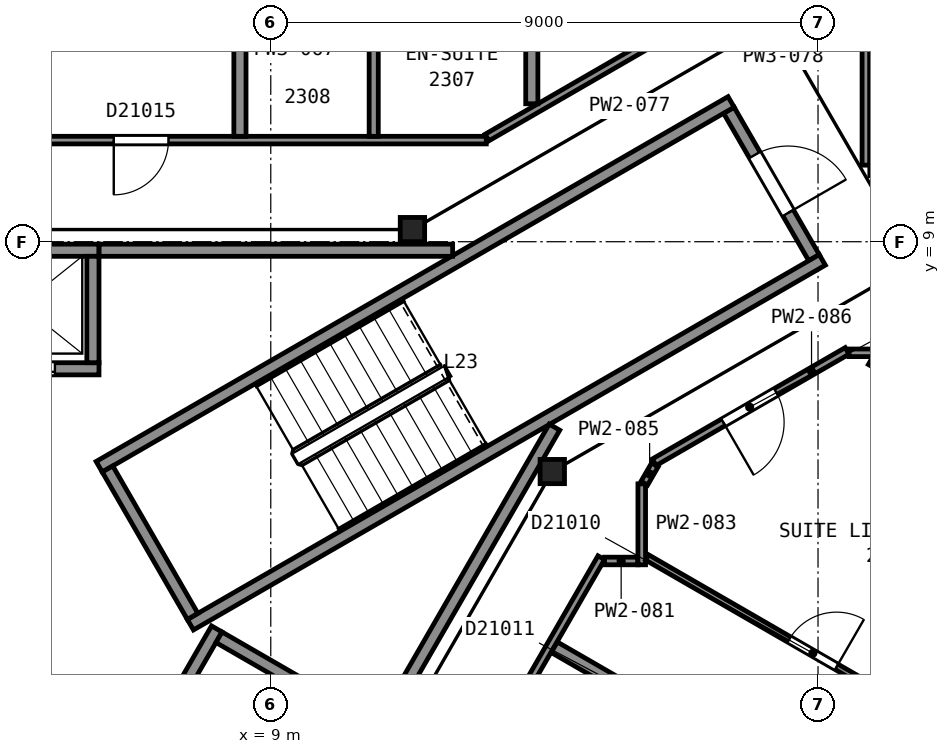
"""IFC4 building model, lengths in metres.
Left out: names, types, materials, properties, quantities, classifications, styles, units other than length and angle.
Written with IfcOpenShell. Run it as: python <this file> out.ifc"""

import sys

from ifc_helpers import new_model, si_unit, direction, frame, frame_2d, origin, origin_2d, place, context, subcontext, project, spatial, rectangle, i_section, extrude, element, fill, save


model = new_model("IFC4")
c1 = context("Model", 3, precision=1e-05, world=origin(), true_north=direction((0.0, 1.0)))
c2 = subcontext(c1, "Body", "Model", "MODEL_VIEW")
j1 = project(units=[si_unit("LENGTHUNIT", "METRE"), si_unit("PLANEANGLEUNIT", "RADIAN")], contexts=[c1])
p1 = place(None, origin())
s1 = spatial("IfcSite", under=j1, at=p1, CompositionType="ELEMENT")
p2 = place(p1, origin())
s2 = spatial("IfcBuilding", under=s1, at=p2, CompositionType="ELEMENT")
p3 = place(p2, frame((0.0, 0.0, 100.0)))
s3 = spatial("IfcBuildingStorey", under=s2, at=p3, CompositionType="ELEMENT", Elevation=100.0)
for number, where, z_axis, x_axis in (
    (1, (13.63, 5.22, 0.0), (0.0, 0.0, 1.0), (1.0, 0.0, 0.0)),
    (2, (11.33, 9.2, 0.0), (0.0, 0.0, 1.0), (1.0, 0.0, 0.0)),
):
    element("IfcColumn", number, at=place(p3, frame(where, z_axis=z_axis, x_axis=x_axis)), inside=s3, PredefinedType="COLUMN", context=c2, shape_type="SweptSolid", body=[
        extrude(i_section(OverallWidth=0.401, OverallDepth=0.399, WebThickness=0.025, FlangeThickness=0.04, FilletRadius=0.015, at=origin_2d()), origin(), (0.0, 0.0, 1.0), 3.6),
    ])
p4 = place(p3, frame((17.934, 8.738, 0.0), z_axis=(0.0, 0.0, 1.0), x_axis=(-0.49998411664, 0.866034573852, 0.0)))
e3 = element("IfcWall", 3, at=p4, inside=s3, PredefinedType="PARTITIONING", context=c2, shape_type="SweptSolid", body=[
    extrude(rectangle(XDim=2.8, YDim=0.2, at=frame_2d((1.4, 0.0))), origin(), (0.0, 0.0, 1.0), 3.35),
])
p5 = place(p4, frame((0.85, 0.0, 0.0)))
e4 = element("IfcOpeningElement", 4, at=p5, cuts=e3, PredefinedType="OPENING", context=c2, shape_type="SweptSolid", body=[
    extrude(rectangle(XDim=1.1, YDim=2.1, at=frame_2d((0.55, 1.05))), frame((0.0, 0.11, 0.0), z_axis=(0.0, -1.0, 0.0), x_axis=(1.0, 0.0, 0.0)), (0.0, 0.0, 1.0), 0.22),
])
for number, where, z_axis, x_axis in (
    (5, (6.178, 5.299, 0.0), (0.0, 0.0, 1.0), (0.866, 0.5, 0.0)),
    (6, (7.678, 2.701, 0.0), (0.0, 0.0, 1.0), (0.866, 0.5, 0.0)),
):
    element("IfcWall", number, at=place(p3, frame(where, z_axis=z_axis, x_axis=x_axis)), inside=s3, PredefinedType="PARTITIONING", context=c2, shape_type="SweptSolid", body=[
        extrude(rectangle(XDim=12.0, YDim=0.2, at=frame_2d((6.0, 0.0))), origin(), (0.0, 0.0, 1.0), 3.35),
    ])
p6 = place(p3, frame((7.715, 2.838, 0.0), z_axis=(0.0, 0.0, 1.0), x_axis=(-0.500049511043, 0.865996816683, 0.0)))
e7 = element("IfcWall", 7, at=p6, inside=s3, PredefinedType="PARTITIONING", context=c2, shape_type="SweptSolid", body=[
    extrude(rectangle(XDim=2.8, YDim=0.2, at=frame_2d((1.4, 0.0))), origin(), (0.0, 0.0, 1.0), 3.35),
])
p7 = place(p3, frame((3.625, 6.91, 0.0), z_axis=(0.0, 0.0, 1.0), x_axis=(1.0, 0.0, 0.0)))
e8 = element("IfcWall", 8, at=p7, inside=s3, PredefinedType="PARTITIONING", context=c2, shape_type="SweptSolid", body=[
    extrude(rectangle(XDim=2.55, YDim=0.2, at=frame_2d((1.275, 0.0))), origin(), (0.0, 0.0, 1.0), 3.6),
])
p8 = place(p7, frame((0.725, 0.0, 0.0)))
e9 = element("IfcOpeningElement", 9, at=p8, cuts=e8, PredefinedType="OPENING", context=c2, shape_type="SweptSolid", body=[
    extrude(rectangle(XDim=1.1, YDim=2.1, at=frame_2d((0.55, 1.05))), frame((0.0, 0.11, 0.0), z_axis=(0.0, -1.0, 0.0), x_axis=(1.0, 0.0, 0.0)), (0.0, 0.0, 1.0), 0.22),
])
p9 = place(p3, frame((3.625, 8.86, 0.0), z_axis=(0.0, 0.0, 1.0), x_axis=(1.0, 0.0, 0.0)))
e10 = element("IfcWall", 10, at=p9, inside=s3, PredefinedType="PARTITIONING", context=c2, shape_type="SweptSolid", body=[
    extrude(rectangle(XDim=2.55, YDim=0.2, at=frame_2d((1.275, 0.0))), origin(), (0.0, 0.0, 1.0), 3.6),
])
p10 = place(p3, frame((5.663, -1.612, 0.0), z_axis=(0.0, 0.0, 1.0), x_axis=(0.49998122708, 0.866036242063, 0.0)))
e11 = element("IfcWall", 11, at=p10, inside=s3, PredefinedType="PARTITIONING", context=c2, shape_type="SweptSolid", body=[
    extrude(rectangle(XDim=4.9, YDim=0.2, at=frame_2d((2.45, 0.0))), origin(), (0.0, 0.0, 1.0), 3.6),
])
p11 = place(p3, frame((6.075, 7.01, 0.0), z_axis=(0.0, 0.0, 1.0), x_axis=(0.0, 1.0, 0.0)))
e12 = element("IfcWall", 12, at=p11, inside=s3, PredefinedType="PARTITIONING", context=c2, shape_type="SweptSolid", body=[
    extrude(rectangle(XDim=1.75, YDim=0.2, at=frame_2d((0.875, 0.0))), origin(), (0.0, 0.0, 1.0), 3.6),
])
p12 = place(p3, frame((9.665, 1.62, 0.0), z_axis=(0.0, 0.0, 1.0), x_axis=(-0.866002029911, 0.500040482552, 0.0)))
e13 = element("IfcWall", 13, at=p12, inside=s3, PredefinedType="PARTITIONING", context=c2, shape_type="SweptSolid", body=[
    extrude(rectangle(XDim=1.75, YDim=0.2, at=frame_2d((0.875, 0.0))), origin(), (0.0, 0.0, 1.0), 3.6),
])
p13 = place(p3, frame((6.177, 8.86, 0.0), z_axis=(0.0, 0.0, 1.0), x_axis=(1.0, 0.0, 0.0)))
e14 = element("IfcWall", 14, at=p13, inside=s3, PredefinedType="PARTITIONING", context=c2, shape_type="SweptSolid", body=[
    extrude(rectangle(XDim=5.814, YDim=0.2, at=frame_2d((2.907, 0.0))), origin(), (0.0, 0.0, 1.0), 3.35),
])
p14 = place(p3, frame((8.492, -3.012, 0.0), z_axis=(0.0, 0.0, 1.0), x_axis=(0.499972957231, 0.866041016371, 0.0)))
e15 = element("IfcWall", 15, at=p14, inside=s3, PredefinedType="PARTITIONING", context=c2, shape_type="SweptSolid", body=[
    extrude(rectangle(XDim=10.349, YDim=0.2, at=frame_2d((5.174, 0.0))), origin(), (0.0, 0.0, 1.0), 3.35),
])
p15 = place(p3, frame((-12.544, 10.671, 0.0), z_axis=(0.0, 0.0, 1.0), x_axis=(1.0, 0.0, 0.0)))
e16 = element("IfcWall", 16, at=p15, inside=s3, PredefinedType="PARTITIONING", context=c2, shape_type="SweptSolid", body=[
    extrude(rectangle(XDim=25.089, YDim=0.125, at=frame_2d((12.544, 0.0))), origin(), (0.0, 0.0, 1.0), 2.613),
])
p16 = place(p15, frame((18.962, 0.0, 0.0)))
e17 = element("IfcOpeningElement", 17, at=p16, cuts=e16, PredefinedType="OPENING", context=c2, shape_type="SweptSolid", body=[
    extrude(rectangle(XDim=0.9, YDim=2.1, at=frame_2d((0.45, 1.05))), frame((0.0, 0.073, 0.0), z_axis=(0.0, -1.0, 0.0), x_axis=(1.0, 0.0, 0.0)), (0.0, 0.0, 1.0), 0.145),
])
p17 = place(p15, frame((14.857, 0.0, 0.0)))
e18 = element("IfcOpeningElement", 18, at=p17, cuts=e16, PredefinedType="OPENING", context=c2, shape_type="SweptSolid", body=[
    extrude(rectangle(XDim=1.0, YDim=2.1, at=frame_2d((0.5, 1.05))), frame((0.0, 0.073, 0.0), z_axis=(0.0, -1.0, 0.0), x_axis=(1.0, 0.0, 0.0)), (0.0, 0.0, 1.0), 0.145),
])
p18 = place(p3, frame((8.493, 10.733, 0.0), z_axis=(0.0, 0.0, 1.0), x_axis=(0.0, 1.0, 0.0)))
e19 = element("IfcWall", 19, at=p18, inside=s3, PredefinedType="PARTITIONING", context=c2, shape_type="SweptSolid", body=[
    extrude(rectangle(XDim=2.838, YDim=0.2, at=frame_2d((1.419, 0.0))), origin(), (0.0, 0.0, 1.0), 2.613),
])
p19 = place(p3, frame((9.41, -4.902, 0.0), z_axis=(0.0, 0.0, 1.0), x_axis=(0.499971244726, 0.866042005013, 0.0)))
e20 = element("IfcWall", 20, at=p19, inside=s3, PredefinedType="PARTITIONING", context=c2, shape_type="SweptSolid", body=[
    extrude(rectangle(XDim=10.052, YDim=0.125, at=frame_2d((5.026, 0.0))), origin(), (0.0, 0.0, 1.0), 2.613),
])
p20 = place(p3, frame((10.693, 10.733, 0.0), z_axis=(0.0, 0.0, 1.0), x_axis=(0.0, 1.0, 0.0)))
e21 = element("IfcWall", 21, at=p20, inside=s3, PredefinedType="PARTITIONING", context=c2, shape_type="SweptSolid", body=[
    extrude(rectangle(XDim=6.982, YDim=0.15, at=frame_2d((3.491, 0.0))), origin(), (0.0, 0.0, 1.0), 2.613),
])
p21 = place(p3, frame((12.556, 10.713, 0.0), z_axis=(0.0, 0.0, 1.0), x_axis=(0.86603035395, 0.499991425964, 0.0)))
e22 = element("IfcWall", 22, at=p21, inside=s3, PredefinedType="PARTITIONING", context=c2, shape_type="SweptSolid", body=[
    extrude(rectangle(XDim=3.824, YDim=0.125, at=frame_2d((1.912, 0.0))), origin(), (0.0, 0.0, 1.0), 2.613),
])
p22 = place(p3, frame((13.293, 11.269, 0.0), z_axis=(0.0, 0.0, 1.0), x_axis=(0.0, 1.0, 0.0)))
e23 = element("IfcWall", 23, at=p22, inside=s3, PredefinedType="PARTITIONING", context=c2, shape_type="SweptSolid", body=[
    extrude(rectangle(XDim=3.665, YDim=0.2, at=frame_2d((1.833, 0.0))), origin(), (0.0, 0.0, 1.0), 2.613),
])
p23 = place(p22, frame((1.32, 0.0, 0.0)))
e24 = element("IfcOpeningElement", 24, at=p23, cuts=e23, PredefinedType="OPENING", context=c2, shape_type="SweptSolid", body=[
    extrude(rectangle(XDim=0.8, YDim=2.1, at=frame_2d((0.4, 1.05))), frame((0.0, 0.11, 0.0), z_axis=(0.0, -1.0, 0.0), x_axis=(1.0, 0.0, 0.0)), (0.0, 0.0, 1.0), 0.22),
])
p24 = place(p3, frame((16.463, 0.714, 0.0), z_axis=(0.0, 0.0, 1.0), x_axis=(-0.86609757561, 0.499874973892, 0.0)))
e25 = element("IfcWall", 25, at=p24, inside=s3, PredefinedType="PARTITIONING", context=c2, shape_type="SweptSolid", body=[
    extrude(rectangle(XDim=3.233, YDim=0.2, at=frame_2d((1.617, 0.0))), origin(), (0.0, 0.0, 1.0), 2.613),
])
p25 = place(p24, frame((1.301, 0.0, 0.0)))
e26 = element("IfcOpeningElement", 26, at=p25, cuts=e25, PredefinedType="OPENING", context=c2, shape_type="SweptSolid", body=[
    extrude(rectangle(XDim=0.8, YDim=2.1, at=frame_2d((0.4, 1.05))), frame((0.0, 0.11, 0.0), z_axis=(0.0, -1.0, 0.0), x_axis=(1.0, 0.0, 0.0)), (0.0, 0.0, 1.0), 0.22),
])
p26 = place(p3, frame((14.489, 3.749, 0.0), z_axis=(0.0, 0.0, 1.0), x_axis=(1.0, 0.0, 0.0)))
e27 = element("IfcWall", 27, at=p26, inside=s3, PredefinedType="PARTITIONING", context=c2, shape_type="SweptSolid", body=[
    extrude(rectangle(XDim=0.547, YDim=0.125, at=frame_2d((0.273, 0.0))), origin(), (0.0, 0.0, 1.0), 2.613),
])
p27 = place(p3, frame((15.101, 3.687, 0.0), z_axis=(0.0, 0.0, 1.0), x_axis=(0.0, 1.0, 0.0)))
e28 = element("IfcWall", 28, at=p27, inside=s3, PredefinedType="PARTITIONING", context=c2, shape_type="SweptSolid", body=[
    extrude(rectangle(XDim=1.331, YDim=0.125, at=frame_2d((0.666, 0.0))), origin(), (0.0, 0.0, 1.0), 2.613),
])
p28 = place(p3, frame((20.787, 0.575, 0.0), z_axis=(0.0, 0.0, 1.0), x_axis=(-0.866012632051, 0.500022120638, 0.0)))
e29 = element("IfcWall", 29, at=p28, inside=s3, PredefinedType="PARTITIONING", context=c2, shape_type="SweptSolid", body=[
    extrude(rectangle(XDim=6.465, YDim=0.1, at=frame_2d((3.232, 0.0))), origin(), (0.0, 0.0, 1.0), 2.613),
])
p29 = place(p28, frame((2.866, 0.0, 0.0)))
e30 = element("IfcOpeningElement", 30, at=p29, cuts=e29, PredefinedType="OPENING", context=c2, shape_type="SweptSolid", body=[
    extrude(rectangle(XDim=0.9, YDim=2.1, at=frame_2d((0.45, 1.05))), frame((0.0, 0.06, 0.0), z_axis=(0.0, -1.0, 0.0), x_axis=(1.0, 0.0, 0.0)), (0.0, 0.0, 1.0), 0.12),
])
p30 = place(p3, frame((15.144, 5.029, 0.0), z_axis=(0.0, 0.0, 1.0), x_axis=(0.499682006278, 0.86620891972, 0.0)))
e31 = element("IfcWall", 31, at=p30, inside=s3, PredefinedType="PARTITIONING", context=c2, shape_type="SweptSolid", body=[
    extrude(rectangle(XDim=0.348, YDim=0.125, at=frame_2d((0.174, 0.0))), origin(), (0.0, 0.0, 1.0), 2.613),
])
p31 = place(p3, frame((18.478, 7.204, 0.0), z_axis=(0.0, 0.0, 1.0), x_axis=(-0.866011320536, -0.500024392108, 0.0)))
e32 = element("IfcWall", 32, at=p31, inside=s3, PredefinedType="PARTITIONING", context=c2, shape_type="SweptSolid", body=[
    extrude(rectangle(XDim=3.663, YDim=0.125, at=frame_2d((1.832, 0.0))), origin(), (0.0, 0.0, 1.0), 2.613),
])
p32 = place(p31, frame((1.351, 0.0, 0.0)))
e33 = element("IfcOpeningElement", 33, at=p32, cuts=e32, PredefinedType="OPENING", context=c2, shape_type="SweptSolid", body=[
    extrude(rectangle(XDim=1.0, YDim=2.1, at=frame_2d((0.5, 1.05))), frame((0.0, 0.073, 0.0), z_axis=(0.0, -1.0, 0.0), x_axis=(1.0, 0.0, 0.0)), (0.0, 0.0, 1.0), 0.145),
])
p33 = place(p3, frame((18.509, 7.173, 0.0), z_axis=(0.0, 0.0, 1.0), x_axis=(1.0, 0.0, 0.0)))
e34 = element("IfcWall", 34, at=p33, inside=s3, PredefinedType="PARTITIONING", context=c2, shape_type="SweptSolid", body=[
    extrude(rectangle(XDim=2.513, YDim=0.125, at=frame_2d((1.256, 0.0))), origin(), (0.0, 0.0, 1.0), 2.613),
])
p34 = place(p3, frame((18.866, 7.046, 0.0), z_axis=(0.0, 0.0, 1.0), x_axis=(0.866042025588, -0.499971209087, 0.0)))
e35 = element("IfcWall", 35, at=p34, inside=s3, PredefinedType="PARTITIONING", context=c2, shape_type="SweptSolid", body=[
    extrude(rectangle(XDim=4.899, YDim=0.15, at=frame_2d((2.45, 0.0))), origin(), (0.0, 0.0, 1.0), 2.613),
])
p35 = place(p3, frame((18.787, 10.259, 0.0), z_axis=(0.0, 0.0, 1.0), x_axis=(0.0, 1.0, 0.0)))
e36 = element("IfcWall", 36, at=p35, inside=s3, PredefinedType="PARTITIONING", context=c2, shape_type="SweptSolid", body=[
    extrude(rectangle(XDim=3.93, YDim=0.125, at=frame_2d((1.965, 0.0))), origin(), (0.0, 0.0, 1.0), 2.613),
])
p36 = place(p5, origin())
e37 = element("IfcDoor", 37, at=p36, inside=s3, OperationType="SINGLE_SWING_LEFT", PredefinedType="DOOR", context=c2, shape_type="SweptSolid", body=[
    extrude(rectangle(XDim=1.1, YDim=2.1, at=frame_2d((0.55, 1.05))), frame((0.0, 0.025, 0.0), z_axis=(0.0, -1.0, 0.0), x_axis=(1.0, 0.0, 0.0)), (0.0, 0.0, 1.0), 0.05),
])
fill(e4, e37)
p37 = place(p8, origin())
e38 = element("IfcDoor", 38, at=p37, inside=s3, OperationType="SLIDING_TO_LEFT", PredefinedType="DOOR", context=c2, shape_type="SweptSolid", body=[
    extrude(rectangle(XDim=1.1, YDim=2.1, at=frame_2d((0.55, 1.05))), frame((0.0, 0.025, 0.0), z_axis=(0.0, -1.0, 0.0), x_axis=(1.0, 0.0, 0.0)), (0.0, 0.0, 1.0), 0.05),
])
fill(e9, e38)
p38 = place(p16, origin())
e39 = element("IfcDoor", 39, at=p38, inside=s3, OperationType="SINGLE_SWING_LEFT", PredefinedType="DOOR", context=c2, shape_type="SweptSolid", body=[
    extrude(rectangle(XDim=0.9, YDim=2.1, at=frame_2d((0.45, 1.05))), frame((0.0, 0.025, 0.0), z_axis=(0.0, -1.0, 0.0), x_axis=(1.0, 0.0, 0.0)), (0.0, 0.0, 1.0), 0.05),
])
fill(e17, e39)
p39 = place(p29, origin())
e40 = element("IfcDoor", 40, at=p39, inside=s3, OperationType="SINGLE_SWING_LEFT", PredefinedType="DOOR", context=c2, shape_type="SweptSolid", body=[
    extrude(rectangle(XDim=0.9, YDim=2.1, at=frame_2d((0.45, 1.05))), frame((0.0, 0.025, 0.0), z_axis=(0.0, -1.0, 0.0), x_axis=(1.0, 0.0, 0.0)), (0.0, 0.0, 1.0), 0.05),
])
fill(e30, e40)
p40 = place(p32, origin())
e41 = element("IfcDoor", 41, at=p40, inside=s3, OperationType="SINGLE_SWING_RIGHT", PredefinedType="DOOR", context=c2, shape_type="SweptSolid", body=[
    extrude(rectangle(XDim=1.0, YDim=2.1, at=frame_2d((0.5, 1.05))), frame((0.0, 0.025, 0.0), z_axis=(0.0, -1.0, 0.0), x_axis=(1.0, 0.0, 0.0)), (0.0, 0.0, 1.0), 0.05),
])
fill(e33, e41)
save(model, sys.argv[1])
